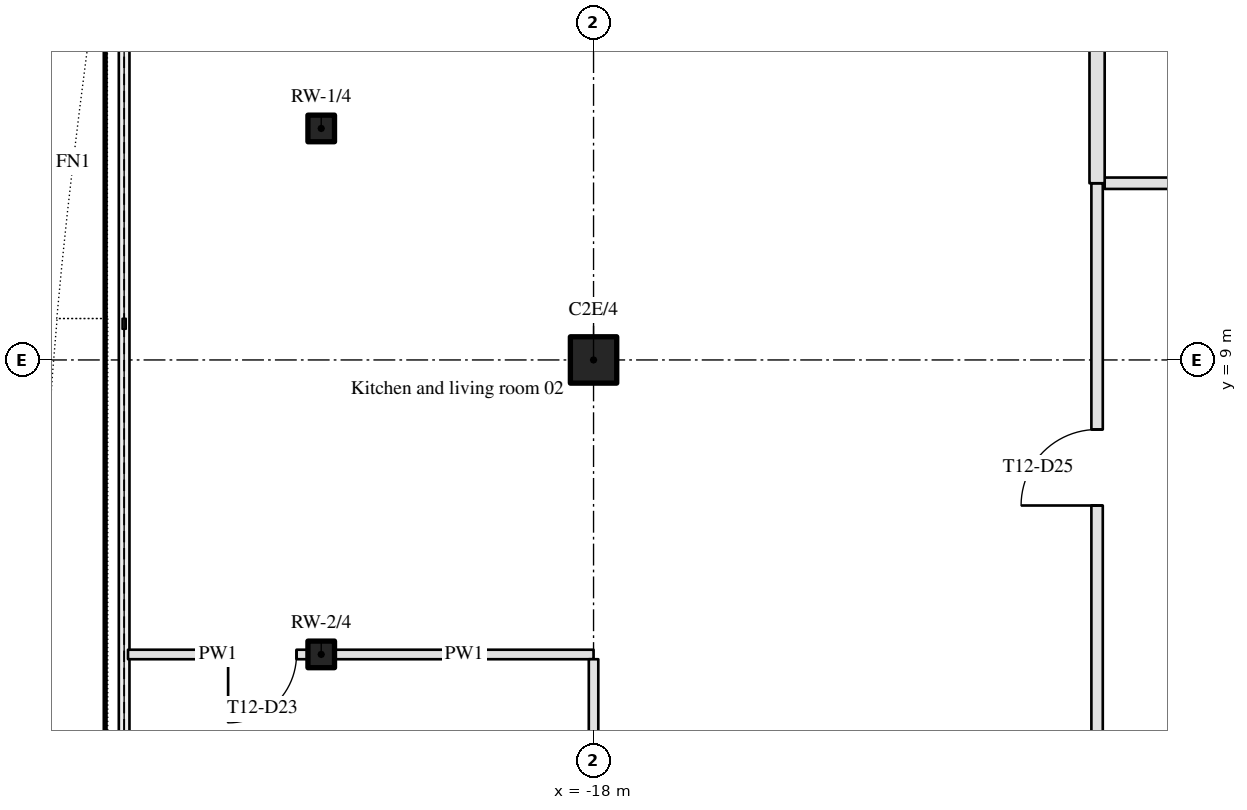
"""IFC4 building model, lengths in metres.
Left out: names, types, materials, properties, quantities, classifications, styles, units other than length and angle.
Written with IfcOpenShell. Run it as: python <this file> out.ifc"""

import sys

from ifc_helpers import new_model, si_unit, direction, frame, frame_2d, origin, origin_2d, place, context, subcontext, project, spatial, rectangle, hollow_rectangle, hollow_circle, extrude, element, fill, save


model = new_model("IFC4")
c1 = context("Model", 3, precision=1e-05, world=origin(), true_north=direction((0.0, 1.0)))
c2 = subcontext(c1, "Body", "Model", "MODEL_VIEW")
j1 = project(units=[si_unit("LENGTHUNIT", "METRE"), si_unit("PLANEANGLEUNIT", "RADIAN")], contexts=[c1])
p1 = place(None, origin())
s1 = spatial("IfcSite", under=j1, at=p1, CompositionType="ELEMENT")
p2 = place(p1, origin())
s2 = spatial("IfcBuilding", under=s1, at=p2, CompositionType="ELEMENT")
p3 = place(p2, frame((0.0, 0.0, 172.2)))
s3 = spatial("IfcBuildingStorey", under=s2, at=p3, CompositionType="ELEMENT", Elevation=172.2)
p4 = place(p3, frame((-18.0, 9.0, 0.0), z_axis=(0.0, 0.0, 1.0), x_axis=(1.0, 0.0, 0.0)))
e1 = element("IfcColumn", 1, at=p4, inside=s3, PredefinedType="COLUMN", context=c2, shape_type="SweptSolid", body=[
    extrude(hollow_circle(Radius=0.305, WallThickness=0.03, at=origin_2d()), origin(), (0.0, 0.0, 1.0), 3.15),
])
for number, where, z_axis, x_axis in (
    (2, (-21.583, 12.046, 0.0), (0.0, 0.0, 1.0), (1.0, 0.0, 0.0)),
    (3, (-21.583, 5.126, 0.0), (0.0, 0.0, 1.0), (1.0, 0.0, 0.0)),
):
    element("IfcColumn", number, at=place(p3, frame(where, z_axis=z_axis, x_axis=x_axis)), inside=s3, PredefinedType="COLUMN", context=c2, shape_type="SweptSolid", body=[
        extrude(hollow_rectangle(XDim=0.35, YDim=0.35, WallThickness=0.02, InnerFilletRadius=0.03, OuterFilletRadius=0.05, at=origin_2d()), origin(), (0.0, 0.0, 1.0), 3.15),
    ])
p5 = place(p3, frame((-21.758, 5.125, 0.0), z_axis=(0.0, 0.0, 1.0), x_axis=(-1.0, 0.0, 0.0)))
e4 = element("IfcWall", 4, at=p5, inside=s3, PredefinedType="PARTITIONING", context=c2, shape_type="SweptSolid", body=[
    extrude(rectangle(XDim=2.367, YDim=0.125, at=frame_2d((1.184, 0.0))), origin(), (0.0, 0.0, 1.0), 2.21),
])
p6 = place(p5, frame((0.15, 0.0, 0.0)))
e5 = element("IfcOpeningElement", 5, at=p6, cuts=e4, PredefinedType="OPENING", context=c2, shape_type="SweptSolid", body=[
    extrude(rectangle(XDim=0.9, YDim=2.1, at=frame_2d((0.45, 1.05))), frame((0.0, 0.073, 0.0), z_axis=(0.0, -1.0, 0.0), x_axis=(1.0, 0.0, 0.0)), (0.0, 0.0, 1.0), 0.145),
])
p7 = place(p3, frame((-21.408, 5.125, 0.0), z_axis=(0.0, 0.0, 1.0), x_axis=(1.0, 0.0, 0.0)))
e6 = element("IfcWall", 6, at=p7, inside=s3, PredefinedType="PARTITIONING", context=c2, shape_type="SweptSolid", body=[
    extrude(rectangle(XDim=3.408, YDim=0.125, at=frame_2d((1.704, 0.0))), origin(), (0.0, 0.0, 1.0), 2.21),
])
p8 = place(p3, frame((-11.275, 11.325, 0.0), z_axis=(0.0, 0.0, 1.0), x_axis=(1.0, 0.0, 0.0)))
e7 = element("IfcWall", 7, at=p8, inside=s3, PredefinedType="PARTITIONING", context=c2, shape_type="SweptSolid", body=[
    extrude(rectangle(XDim=22.575, YDim=0.15, at=frame_2d((11.288, 0.0))), origin(), (0.0, 0.0, 1.0), 2.21),
])
p9 = place(p8, frame((6.795, 0.0, 0.0)))
e8 = element("IfcOpeningElement", 8, at=p9, cuts=e7, PredefinedType="OPENING", context=c2, shape_type="SweptSolid", body=[
    extrude(rectangle(XDim=1.0, YDim=2.1, at=frame_2d((0.5, 1.05))), frame((0.0, 0.085, 0.0), z_axis=(0.0, -1.0, 0.0), x_axis=(1.0, 0.0, 0.0)), (0.0, 0.0, 1.0), 0.17),
])
p10 = place(p8, frame((16.032, 0.0, 0.0)))
e9 = element("IfcOpeningElement", 9, at=p10, cuts=e7, PredefinedType="OPENING", context=c2, shape_type="SweptSolid", body=[
    extrude(rectangle(XDim=1.0, YDim=2.1, at=frame_2d((0.5, 1.05))), frame((0.0, 0.085, 0.0), z_axis=(0.0, -1.0, 0.0), x_axis=(1.0, 0.0, 0.0)), (0.0, 0.0, 1.0), 0.17),
])
p11 = place(p3, frame((-18.0, 0.305, 0.0), z_axis=(0.0, 0.0, 1.0), x_axis=(0.0, 1.0, 0.0)))
e10 = element("IfcWall", 10, at=p11, inside=s3, PredefinedType="PARTITIONING", context=c2, shape_type="SweptSolid", body=[
    extrude(rectangle(XDim=4.758, YDim=0.125, at=frame_2d((2.379, 0.0))), origin(), (0.0, 0.0, 1.0), 2.21),
])
p12 = place(p3, frame((-11.375, -11.925, 0.0), z_axis=(0.0, 0.0, 1.0), x_axis=(0.0, 1.0, 0.0)))
e11 = element("IfcWall", 11, at=p12, inside=s3, PredefinedType="PARTITIONING", context=c2, shape_type="SweptSolid", body=[
    extrude(rectangle(XDim=23.25, YDim=0.15, at=frame_2d((11.625, 0.0))), origin(), (0.0, 0.0, 1.0), 2.21),
])
p13 = place(p12, frame((1.067, 0.0, 0.0)))
e12 = element("IfcOpeningElement", 12, at=p13, cuts=e11, PredefinedType="OPENING", context=c2, shape_type="SweptSolid", body=[
    extrude(rectangle(XDim=1.0, YDim=2.1, at=frame_2d((0.5, 1.05))), frame((0.0, 0.085, 0.0), z_axis=(0.0, -1.0, 0.0), x_axis=(1.0, 0.0, 0.0)), (0.0, 0.0, 1.0), 0.17),
])
p14 = place(p12, frame((19.01, 0.0, 0.0)))
e13 = element("IfcOpeningElement", 13, at=p14, cuts=e11, PredefinedType="OPENING", context=c2, shape_type="SweptSolid", body=[
    extrude(rectangle(XDim=1.0, YDim=2.1, at=frame_2d((0.5, 1.05))), frame((0.0, 0.085, 0.0), z_axis=(0.0, -1.0, 0.0), x_axis=(1.0, 0.0, 0.0)), (0.0, 0.0, 1.0), 0.17),
])
p15 = place(p3, frame((-11.375, 11.325, 0.0), z_axis=(0.0, 0.0, 1.0), x_axis=(0.0, 1.0, 0.0)))
e14 = element("IfcWall", 14, at=p15, inside=s3, PredefinedType="PARTITIONING", context=c2, shape_type="SweptSolid", body=[
    extrude(rectangle(XDim=9.8, YDim=0.2, at=frame_2d((4.9, 0.0))), origin(), (0.0, 0.0, 1.0), 2.21),
])
p16 = place(p14, origin())
e15 = element("IfcDoor", 15, at=p16, inside=s3, OperationType="SINGLE_SWING_LEFT", PredefinedType="DOOR", context=c2, shape_type="SweptSolid", body=[
    extrude(rectangle(XDim=1.0, YDim=2.1, at=frame_2d((0.5, 1.05))), frame((0.0, 0.025, 0.0), z_axis=(0.0, -1.0, 0.0), x_axis=(1.0, 0.0, 0.0)), (0.0, 0.0, 1.0), 0.05),
])
fill(e13, e15)
p17 = place(p6, origin())
e16 = element("IfcDoor", 16, at=p17, inside=s3, OperationType="SINGLE_SWING_RIGHT", PredefinedType="DOOR", context=c2, shape_type="SweptSolid", body=[
    extrude(rectangle(XDim=0.9, YDim=2.1, at=frame_2d((0.45, 1.05))), frame((0.0, 0.025, 0.0), z_axis=(0.0, -1.0, 0.0), x_axis=(1.0, 0.0, 0.0)), (0.0, 0.0, 1.0), 0.05),
])
fill(e5, e16)
save(model, sys.argv[1])
